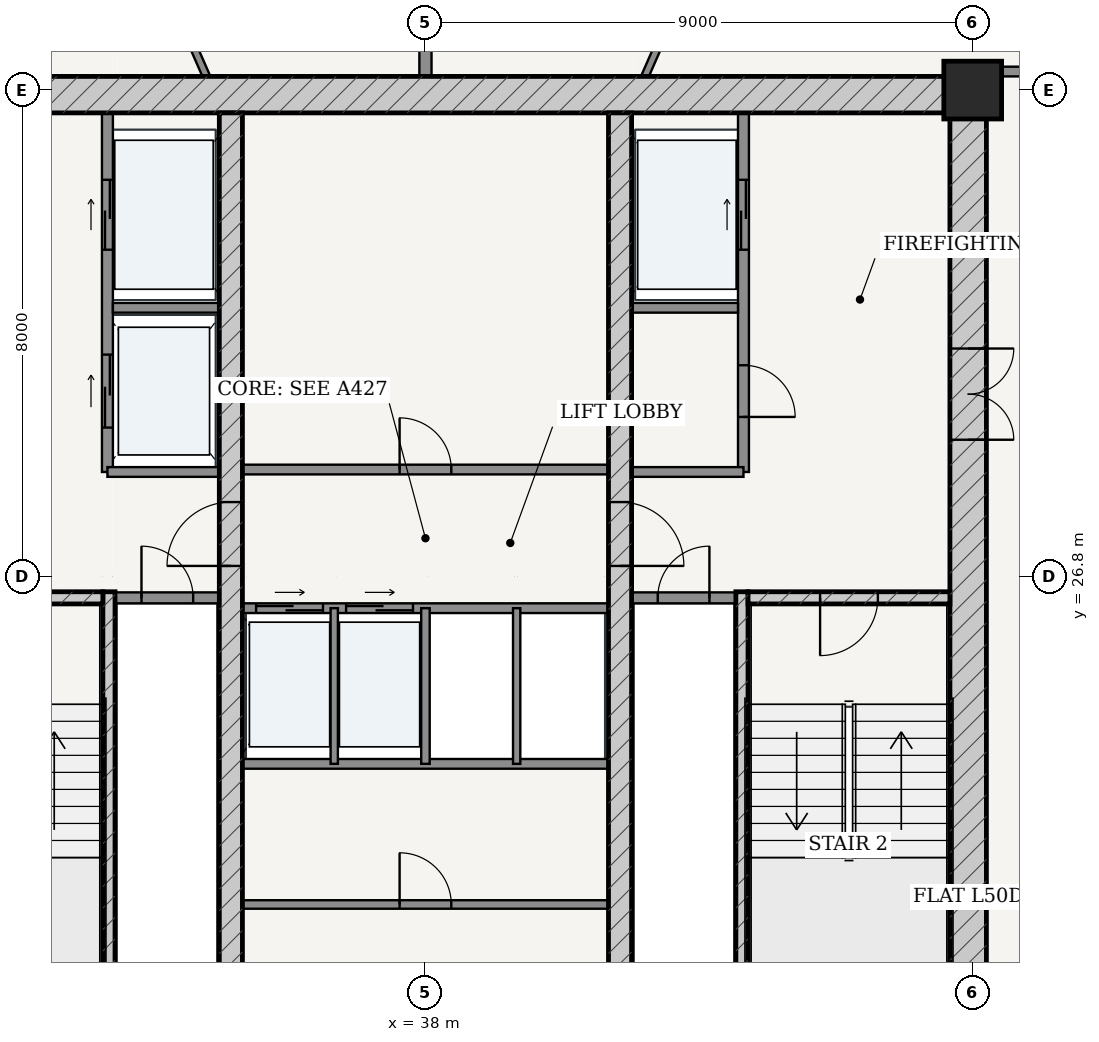
"""IFC4 building model, lengths in metres.
Left out: names, types, materials, properties, quantities, classifications, styles, units other than length and angle.
Written with IfcOpenShell. Run it as: python <this file> out.ifc"""

import sys

from ifc_helpers import new_model, si_unit, direction, frame, frame_2d, origin, origin_2d, place, context, subcontext, project, spatial, rectangle, extrude, source, transform, mapped, element, fill, save


model = new_model("IFC4")
c1 = context("Model", 3, precision=1e-05, world=origin(), true_north=direction((-0.2419218956, 0.970295726276)))
c2 = subcontext(c1, "Body", "Model", "MODEL_VIEW")
j1 = project(units=[si_unit("LENGTHUNIT", "METRE"), si_unit("PLANEANGLEUNIT", "RADIAN")], contexts=[c1])
p1 = place(None, origin())
s1 = spatial("IfcSite", under=j1, at=p1, CompositionType="ELEMENT")
p2 = place(p1, origin())
s2 = spatial("IfcBuilding", under=s1, at=p2, CompositionType="ELEMENT")
p3 = place(p2, frame((0.0, 0.0, 191.2)))
s3 = spatial("IfcBuildingStorey", under=s2, at=p3, CompositionType="ELEMENT", Elevation=191.2)
p4 = place(p3, frame((47.0, 34.8, 0.0), z_axis=(0.0, 0.0, 1.0), x_axis=(1.0, 0.0, 0.0)))
e1 = element("IfcColumn", 1, at=p4, inside=s3, PredefinedType="COLUMN", context=c2, shape_type="SweptSolid", body=[
    extrude(rectangle(XDim=0.95, YDim=0.95, at=origin_2d()), origin(), (0.0, 0.0, 1.0), 3.7),
])
p5 = place(p3, frame((28.775, 34.725, 0.0), z_axis=(0.0, 0.0, 1.0), x_axis=(1.0, 0.0, 0.0)))
e2 = element("IfcWall", 2, at=p5, inside=s3, PredefinedType="SHEAR", context=c2, shape_type="SweptSolid", body=[
    extrude(rectangle(XDim=18.45, YDim=0.6, at=frame_2d((9.225, 0.0))), origin(), (0.0, 0.0, 1.0), 3.435),
])
p6 = place(p3, frame((46.925, 19.175, 0.0), z_axis=(0.0, 0.0, 1.0), x_axis=(0.0, 1.0, 0.0)))
e3 = element("IfcWall", 3, at=p6, inside=s3, PredefinedType="SHEAR", context=c2, shape_type="SweptSolid", body=[
    extrude(rectangle(XDim=15.25, YDim=0.6, at=frame_2d((7.625, 0.0))), origin(), (0.0, 0.0, 1.0), 3.435),
])
p7 = place(p6, frame((9.875, 0.0, 0.0)))
e4 = element("IfcOpeningElement", 4, at=p7, cuts=e3, PredefinedType="OPENING", context=c2, shape_type="SweptSolid", body=[
    extrude(rectangle(XDim=1.5, YDim=2.2, at=frame_2d((0.75, 1.1))), frame((0.0, 0.31, 0.0), z_axis=(0.0, -1.0, 0.0), x_axis=(1.0, 0.0, 0.0)), (0.0, 0.0, 1.0), 0.62),
])
p8 = place(p3, frame((32.795, 19.175, 0.0), z_axis=(0.0, 0.0, 1.0), x_axis=(0.0, 1.0, 0.0)))
e5 = element("IfcWall", 5, at=p8, inside=s3, PredefinedType="SOLIDWALL", context=c2, shape_type="SweptSolid", body=[
    extrude(rectangle(XDim=7.375, YDim=0.2, at=frame_2d((3.688, 0.0))), origin(), (0.0, 0.0, 1.0), 3.435),
])
p9 = place(p3, frame((29.375, 26.45, 0.0), z_axis=(0.0, 0.0, 1.0), x_axis=(1.0, 0.0, 0.0)))
e6 = element("IfcWall", 6, at=p9, inside=s3, PredefinedType="SOLIDWALL", context=c2, shape_type="SweptSolid", body=[
    extrude(rectangle(XDim=3.32, YDim=0.2, at=frame_2d((1.66, 0.0))), origin(), (0.0, 0.0, 1.0), 3.435),
])
p10 = place(p9, frame((1.185, 0.0, 0.0)))
e7 = element("IfcOpeningElement", 7, at=p10, cuts=e6, PredefinedType="OPENING", context=c2, shape_type="SweptSolid", body=[
    extrude(rectangle(XDim=0.95, YDim=2.15, at=frame_2d((0.475, 1.075))), frame((0.0, 0.11, 0.0), z_axis=(0.0, -1.0, 0.0), x_axis=(1.0, 0.0, 0.0)), (0.0, 0.0, 1.0), 0.22),
])
p11 = place(p3, frame((43.205, 19.175, 0.0), z_axis=(0.0, 0.0, 1.0), x_axis=(0.0, 1.0, 0.0)))
e8 = element("IfcWall", 8, at=p11, inside=s3, PredefinedType="SOLIDWALL", context=c2, shape_type="SweptSolid", body=[
    extrude(rectangle(XDim=7.375, YDim=0.2, at=frame_2d((3.688, 0.0))), origin(), (0.0, 0.0, 1.0), 3.435),
])
p12 = place(p3, frame((43.305, 26.45, 0.0), z_axis=(0.0, 0.0, 1.0), x_axis=(1.0, 0.0, 0.0)))
e9 = element("IfcWall", 9, at=p12, inside=s3, PredefinedType="SOLIDWALL", context=c2, shape_type="SweptSolid", body=[
    extrude(rectangle(XDim=3.32, YDim=0.2, at=frame_2d((1.66, 0.0))), origin(), (0.0, 0.0, 1.0), 3.435),
])
p13 = place(p12, frame((1.185, 0.0, 0.0)))
e10 = element("IfcOpeningElement", 10, at=p13, cuts=e9, PredefinedType="OPENING", context=c2, shape_type="SweptSolid", body=[
    extrude(rectangle(XDim=0.95, YDim=2.15, at=frame_2d((0.475, 1.075))), frame((0.0, 0.11, 0.0), z_axis=(0.0, -1.0, 0.0), x_axis=(1.0, 0.0, 0.0)), (0.0, 0.0, 1.0), 0.22),
])
p14 = place(p3, frame((34.8, 19.175, 0.0), z_axis=(0.0, 0.0, 1.0), x_axis=(0.0, 1.0, 0.0)))
e11 = element("IfcWall", 11, at=p14, inside=s3, PredefinedType="SHEAR", context=c2, shape_type="SweptSolid", body=[
    extrude(rectangle(XDim=15.25, YDim=0.38, at=frame_2d((7.625, 0.0))), origin(), (0.0, 0.0, 1.0), 3.435),
])
p15 = place(p14, frame((7.8, 0.0, 0.0)))
e12 = element("IfcOpeningElement", 12, at=p15, cuts=e11, PredefinedType="OPENING", context=c2, shape_type="SweptSolid", body=[
    extrude(rectangle(XDim=1.05, YDim=2.15, at=frame_2d((0.525, 1.075))), frame((0.0, 0.2, 0.0), z_axis=(0.0, -1.0, 0.0), x_axis=(1.0, 0.0, 0.0)), (0.0, 0.0, 1.0), 0.4),
])
p16 = place(p3, frame((41.2, 19.175, 0.0), z_axis=(0.0, 0.0, 1.0), x_axis=(0.0, 1.0, 0.0)))
e13 = element("IfcWall", 13, at=p16, inside=s3, PredefinedType="SHEAR", context=c2, shape_type="SweptSolid", body=[
    extrude(rectangle(XDim=15.25, YDim=0.38, at=frame_2d((7.625, 0.0))), origin(), (0.0, 0.0, 1.0), 3.435),
])
p17 = place(p16, frame((7.8, 0.0, 0.0)))
e14 = element("IfcOpeningElement", 14, at=p17, cuts=e13, PredefinedType="OPENING", context=c2, shape_type="SweptSolid", body=[
    extrude(rectangle(XDim=1.05, YDim=2.15, at=frame_2d((0.525, 1.075))), frame((0.0, 0.2, 0.0), z_axis=(0.0, -1.0, 0.0), x_axis=(1.0, 0.0, 0.0)), (0.0, 0.0, 1.0), 0.4),
])
p18 = place(p3, frame((32.9, 26.45, 0.0), z_axis=(0.0, 0.0, 1.0), x_axis=(1.0, 0.0, 0.0)))
e15 = element("IfcWall", 15, at=p18, inside=s3, PredefinedType="PARTITIONING", context=c2, shape_type="SweptSolid", body=[
    extrude(rectangle(XDim=1.71, YDim=0.18, at=frame_2d((0.855, 0.0))), origin(), (0.0, 0.0, 1.0), 3.435),
])
p19 = place(p18, frame((0.43, 0.0, 0.0)))
e16 = element("IfcOpeningElement", 16, at=p19, cuts=e15, PredefinedType="OPENING", context=c2, shape_type="SweptSolid", body=[
    extrude(rectangle(XDim=0.85, YDim=2.1, at=frame_2d((0.425, 1.05))), frame((0.0, 0.1, 0.0), z_axis=(0.0, -1.0, 0.0), x_axis=(1.0, 0.0, 0.0)), (0.0, 0.0, 1.0), 0.2),
])
p20 = place(p3, frame((41.39, 26.45, 0.0), z_axis=(0.0, 0.0, 1.0), x_axis=(1.0, 0.0, 0.0)))
e17 = element("IfcWall", 17, at=p20, inside=s3, PredefinedType="PARTITIONING", context=c2, shape_type="SweptSolid", body=[
    extrude(rectangle(XDim=1.71, YDim=0.18, at=frame_2d((0.855, 0.0))), origin(), (0.0, 0.0, 1.0), 3.435),
])
p21 = place(p20, frame((0.43, 0.0, 0.0)))
e18 = element("IfcOpeningElement", 18, at=p21, cuts=e17, PredefinedType="OPENING", context=c2, shape_type="SweptSolid", body=[
    extrude(rectangle(XDim=0.85, YDim=2.1, at=frame_2d((0.425, 1.05))), frame((0.0, 0.1, 0.0), z_axis=(0.0, -1.0, 0.0), x_axis=(1.0, 0.0, 0.0)), (0.0, 0.0, 1.0), 0.2),
])
p22 = place(p3, frame((32.77, 28.52, 0.0), z_axis=(0.0, 0.0, 1.0), x_axis=(0.0, 1.0, 0.0)))
e19 = element("IfcWall", 19, at=p22, inside=s3, PredefinedType="PARTITIONING", context=c2, shape_type="SweptSolid", body=[
    extrude(rectangle(XDim=5.905, YDim=0.18, at=frame_2d((2.953, 0.0))), origin(), (0.0, 0.0, 1.0), 3.435),
])
p23 = place(p22, frame((3.655, 0.0, 0.0)))
e20 = element("IfcOpeningElement", 20, at=p23, cuts=e19, PredefinedType="OPENING", context=c2, shape_type="SweptSolid", body=[
    extrude(rectangle(XDim=1.15, YDim=2.2, at=frame_2d((0.575, 1.1))), frame((0.0, 0.1, 0.0), z_axis=(0.0, -1.0, 0.0), x_axis=(1.0, 0.0, 0.0)), (0.0, 0.0, 1.0), 0.2),
])
p24 = place(p22, frame((0.73, 0.0, 0.0)))
e21 = element("IfcOpeningElement", 21, at=p24, cuts=e19, PredefinedType="OPENING", context=c2, shape_type="SweptSolid", body=[
    extrude(rectangle(XDim=1.2, YDim=2.25, at=frame_2d((0.6, 1.125))), frame((0.0, 0.1, 0.0), z_axis=(0.0, -1.0, 0.0), x_axis=(1.0, 0.0, 0.0)), (0.0, 0.0, 1.0), 0.2),
])
p25 = place(p3, frame((32.86, 31.22, 0.0), z_axis=(0.0, 0.0, 1.0), x_axis=(1.0, 0.0, 0.0)))
e22 = element("IfcWall", 22, at=p25, inside=s3, PredefinedType="PARTITIONING", context=c2, shape_type="SweptSolid", body=[
    extrude(rectangle(XDim=1.75, YDim=0.16, at=frame_2d((0.875, 0.0))), origin(), (0.0, 0.0, 1.0), 3.435),
])
p26 = place(p3, frame((32.77, 28.52, 0.0), z_axis=(0.0, 0.0, 1.0), x_axis=(1.0, 0.0, 0.0)))
e23 = element("IfcWall", 23, at=p26, inside=s3, PredefinedType="PARTITIONING", context=c2, shape_type="SweptSolid", body=[
    extrude(rectangle(XDim=1.84, YDim=0.16, at=frame_2d((0.92, 0.0))), origin(), (0.0, 0.0, 1.0), 3.435),
])
p27 = place(p3, frame((43.23, 28.52, 0.0), z_axis=(0.0, 0.0, 1.0), x_axis=(0.0, 1.0, 0.0)))
e24 = element("IfcWall", 24, at=p27, inside=s3, PredefinedType="PARTITIONING", context=c2, shape_type="SweptSolid", body=[
    extrude(rectangle(XDim=5.905, YDim=0.18, at=frame_2d((2.953, 0.0))), origin(), (0.0, 0.0, 1.0), 3.435),
])
p28 = place(p27, frame((0.905, 0.0, 0.0)))
e25 = element("IfcOpeningElement", 25, at=p28, cuts=e24, PredefinedType="OPENING", context=c2, shape_type="SweptSolid", body=[
    extrude(rectangle(XDim=0.85, YDim=2.1, at=frame_2d((0.425, 1.05))), frame((0.0, 0.1, 0.0), z_axis=(0.0, -1.0, 0.0), x_axis=(1.0, 0.0, 0.0)), (0.0, 0.0, 1.0), 0.2),
])
p29 = place(p27, frame((3.655, 0.0, 0.0)))
e26 = element("IfcOpeningElement", 26, at=p29, cuts=e24, PredefinedType="OPENING", context=c2, shape_type="SweptSolid", body=[
    extrude(rectangle(XDim=1.15, YDim=2.2, at=frame_2d((0.575, 1.1))), frame((0.0, 0.1, 0.0), z_axis=(0.0, -1.0, 0.0), x_axis=(1.0, 0.0, 0.0)), (0.0, 0.0, 1.0), 0.2),
])
p30 = place(p3, frame((41.39, 31.22, 0.0), z_axis=(0.0, 0.0, 1.0), x_axis=(1.0, 0.0, 0.0)))
e27 = element("IfcWall", 27, at=p30, inside=s3, PredefinedType="PARTITIONING", context=c2, shape_type="SweptSolid", body=[
    extrude(rectangle(XDim=1.75, YDim=0.16, at=frame_2d((0.875, 0.0))), origin(), (0.0, 0.0, 1.0), 3.435),
])
p31 = place(p3, frame((41.39, 28.52, 0.0), z_axis=(0.0, 0.0, 1.0), x_axis=(1.0, 0.0, 0.0)))
e28 = element("IfcWall", 28, at=p31, inside=s3, PredefinedType="PARTITIONING", context=c2, shape_type="SweptSolid", body=[
    extrude(rectangle(XDim=1.84, YDim=0.16, at=frame_2d((0.92, 0.0))), origin(), (0.0, 0.0, 1.0), 3.435),
])
p32 = place(p3, frame((34.99, 28.56, 0.0), z_axis=(0.0, 0.0, 1.0), x_axis=(1.0, 0.0, 0.0)))
e29 = element("IfcWall", 29, at=p32, inside=s3, PredefinedType="PARTITIONING", context=c2, shape_type="SweptSolid", body=[
    extrude(rectangle(XDim=6.02, YDim=0.16, at=frame_2d((3.01, 0.0))), origin(), (0.0, 0.0, 1.0), 3.435),
])
p33 = place(p32, frame((2.585, 0.0, 0.0)))
e30 = element("IfcOpeningElement", 30, at=p33, cuts=e29, PredefinedType="OPENING", context=c2, shape_type="SweptSolid", body=[
    extrude(rectangle(XDim=0.85, YDim=2.1, at=frame_2d((0.425, 1.05))), frame((0.0, 0.09, 0.0), z_axis=(0.0, -1.0, 0.0), x_axis=(1.0, 0.0, 0.0)), (0.0, 0.0, 1.0), 0.18),
])
p34 = place(p3, frame((34.99, 26.28, 0.0), z_axis=(0.0, 0.0, 1.0), x_axis=(1.0, 0.0, 0.0)))
e31 = element("IfcWall", 31, at=p34, inside=s3, PredefinedType="PARTITIONING", context=c2, shape_type="SweptSolid", body=[
    extrude(rectangle(XDim=6.02, YDim=0.16, at=frame_2d((3.01, 0.0))), origin(), (0.0, 0.0, 1.0), 3.435),
])
p35 = place(p34, frame((0.225, 0.0, 0.0)))
e32 = element("IfcOpeningElement", 32, at=p35, cuts=e31, PredefinedType="OPENING", context=c2, shape_type="SweptSolid", body=[
    extrude(rectangle(XDim=1.1, YDim=2.2, at=frame_2d((0.55, 1.1))), frame((0.0, 0.09, 0.0), z_axis=(0.0, -1.0, 0.0), x_axis=(1.0, 0.0, 0.0)), (0.0, 0.0, 1.0), 0.18),
])
p36 = place(p34, frame((1.705, 0.0, 0.0)))
e33 = element("IfcOpeningElement", 33, at=p36, cuts=e31, PredefinedType="OPENING", context=c2, shape_type="SweptSolid", body=[
    extrude(rectangle(XDim=1.1, YDim=2.2, at=frame_2d((0.55, 1.1))), frame((0.0, 0.09, 0.0), z_axis=(0.0, -1.0, 0.0), x_axis=(1.0, 0.0, 0.0)), (0.0, 0.0, 1.0), 0.18),
])
p37 = place(p3, frame((34.99, 23.72, 0.0), z_axis=(0.0, 0.0, 1.0), x_axis=(1.0, 0.0, 0.0)))
e34 = element("IfcWall", 34, at=p37, inside=s3, PredefinedType="PARTITIONING", context=c2, shape_type="SweptSolid", body=[
    extrude(rectangle(XDim=6.02, YDim=0.16, at=frame_2d((3.01, 0.0))), origin(), (0.0, 0.0, 1.0), 3.435),
])
p38 = place(p3, frame((36.5, 23.72, 0.0), z_axis=(0.0, 0.0, 1.0), x_axis=(0.0, 1.0, 0.0)))
e35 = element("IfcWall", 35, at=p38, inside=s3, PredefinedType="PARTITIONING", context=c2, shape_type="SweptSolid", body=[
    extrude(rectangle(XDim=2.56, YDim=0.12, at=frame_2d((1.28, 0.0))), origin(), (0.0, 0.0, 1.0), 3.435),
])
p39 = place(p3, frame((38.0, 23.72, 0.0), z_axis=(0.0, 0.0, 1.0), x_axis=(0.0, 1.0, 0.0)))
e36 = element("IfcWall", 36, at=p39, inside=s3, PredefinedType="PARTITIONING", context=c2, shape_type="SweptSolid", body=[
    extrude(rectangle(XDim=2.56, YDim=0.14, at=frame_2d((1.28, 0.0))), origin(), (0.0, 0.0, 1.0), 3.435),
])
p40 = place(p3, frame((39.5, 23.72, 0.0), z_axis=(0.0, 0.0, 1.0), x_axis=(0.0, 1.0, 0.0)))
e37 = element("IfcWall", 37, at=p40, inside=s3, PredefinedType="PARTITIONING", context=c2, shape_type="SweptSolid", body=[
    extrude(rectangle(XDim=2.56, YDim=0.12, at=frame_2d((1.28, 0.0))), origin(), (0.0, 0.0, 1.0), 3.435),
])
p41 = place(p3, frame((34.99, 21.407, 0.0), z_axis=(0.0, 0.0, 1.0), x_axis=(1.0, 0.0, 0.0)))
e38 = element("IfcWall", 38, at=p41, inside=s3, PredefinedType="PARTITIONING", context=c2, shape_type="SweptSolid", body=[
    extrude(rectangle(XDim=6.02, YDim=0.14, at=frame_2d((3.01, 0.0))), origin(), (0.0, 0.0, 1.0), 3.435),
])
p42 = place(p41, frame((2.585, 0.0, 0.0)))
e39 = element("IfcOpeningElement", 39, at=p42, cuts=e38, PredefinedType="OPENING", context=c2, shape_type="SweptSolid", body=[
    extrude(rectangle(XDim=0.85, YDim=2.1, at=frame_2d((0.425, 1.05))), frame((0.0, 0.08, 0.0), z_axis=(0.0, -1.0, 0.0), x_axis=(1.0, 0.0, 0.0)), (0.0, 0.0, 1.0), 0.16),
])
p43 = place(p3, frame((47.225, 35.105, 0.0), z_axis=(0.0, 0.0, 1.0), x_axis=(1.0, 0.0, 0.0)))
e40 = element("IfcWall", 40, at=p43, inside=s3, PredefinedType="PARTITIONING", context=c2, shape_type="SweptSolid", body=[
    extrude(rectangle(XDim=1.93, YDim=0.16, at=frame_2d((0.965, 0.0))), origin(), (0.0, 0.0, 1.0), 3.435),
])
p44 = place(p43, frame((0.58, 0.0, 0.0)))
e41 = element("IfcOpeningElement", 41, at=p44, cuts=e40, PredefinedType="OPENING", context=c2, shape_type="SweptSolid", body=[
    extrude(rectangle(XDim=0.98, YDim=2.2, at=frame_2d((0.49, 1.1))), frame((0.0, 0.09, 0.0), z_axis=(0.0, -1.0, 0.0), x_axis=(1.0, 0.0, 0.0)), (0.0, 0.0, 1.0), 0.18),
])
p45 = place(p3, frame((41.61, 35.027, 0.0), z_axis=(0.0, 0.0, 1.0), x_axis=(0.401859508224, 0.915701335398, 0.0)))
e42 = element("IfcWall", 42, at=p45, inside=s3, PredefinedType="PARTITIONING", context=c2, shape_type="SweptSolid", body=[
    extrude(rectangle(XDim=2.83, YDim=0.12, at=frame_2d((1.415, 0.0))), origin(), (0.0, 0.0, 1.0), 3.435),
])
p46 = place(p45, frame((0.965, 0.0, 0.0)))
e43 = element("IfcOpeningElement", 43, at=p46, cuts=e42, PredefinedType="OPENING", context=c2, shape_type="SweptSolid", body=[
    extrude(rectangle(XDim=0.9, YDim=2.15, at=frame_2d((0.45, 1.075))), frame((0.0, 0.07, 0.0), z_axis=(0.0, -1.0, 0.0), x_axis=(1.0, 0.0, 0.0)), (0.0, 0.0, 1.0), 0.14),
])
p47 = place(p3, frame((38.0, 35.027, 0.0), z_axis=(0.0, 0.0, 1.0), x_axis=(0.0, 1.0, 0.0)))
e44 = element("IfcWall", 44, at=p47, inside=s3, PredefinedType="PARTITIONING", context=c2, shape_type="SweptSolid", body=[
    extrude(rectangle(XDim=11.413, YDim=0.2, at=frame_2d((5.707, 0.0))), origin(), (0.0, 0.0, 1.0), 2.52),
])
p48 = place(p3, frame((34.397, 35.027, 0.0), z_axis=(0.0, 0.0, 1.0), x_axis=(-0.401135725485, 0.916018629581, 0.0)))
e45 = element("IfcWall", 45, at=p48, inside=s3, PredefinedType="PARTITIONING", context=c2, shape_type="SweptSolid", body=[
    extrude(rectangle(XDim=2.829, YDim=0.12, at=frame_2d((1.415, 0.0))), origin(), (0.0, 0.0, 1.0), 3.435),
])
p49 = place(p48, frame((0.985, 0.0, 0.0)))
e46 = element("IfcOpeningElement", 46, at=p49, cuts=e45, PredefinedType="OPENING", context=c2, shape_type="SweptSolid", body=[
    extrude(rectangle(XDim=0.86, YDim=2.15, at=frame_2d((0.43, 1.075))), frame((0.0, 0.07, 0.0), z_axis=(0.0, -1.0, 0.0), x_axis=(1.0, 0.0, 0.0)), (0.0, 0.0, 1.0), 0.14),
])
m1 = source(origin(), c2, "Body", "SweptSolid", [
    extrude(rectangle(XDim=1.5, YDim=2.2, at=frame_2d((0.75, 1.1))), frame((0.0, 0.025, 0.0), z_axis=(0.0, -1.0, 0.0), x_axis=(1.0, 0.0, 0.0)), (0.0, 0.0, 1.0), 0.05),
])
p50 = place(p7, frame((1.5, 0.0, 0.0), z_axis=(0.0, 0.0, 1.0), x_axis=(-1.0, 0.0, 0.0)))
e47 = element("IfcDoor", 47, at=p50, inside=s3, OperationType="DOUBLE_DOOR_SINGLE_SWING", PredefinedType="DOOR", context=c2, shape_type="MappedRepresentation", body=[
    mapped(m1, transform((0.0, 0.0, 0.0), scale=1.0)),
])
fill(e4, e47)
m2 = source(origin(), c2, "Body", "SweptSolid", [
    extrude(rectangle(XDim=1.05, YDim=2.15, at=frame_2d((0.525, 1.075))), frame((0.0, 0.025, 0.0), z_axis=(0.0, -1.0, 0.0), x_axis=(1.0, 0.0, 0.0)), (0.0, 0.0, 1.0), 0.05),
])
p51 = place(p15, origin())
e48 = element("IfcDoor", 48, at=p51, inside=s3, OperationType="SINGLE_SWING_LEFT", PredefinedType="DOOR", context=c2, shape_type="MappedRepresentation", body=[
    mapped(m2, transform((0.0, 0.0, 0.0), scale=1.0)),
])
fill(e12, e48)
p52 = place(p17, frame((1.05, 0.0, 0.0), z_axis=(0.0, 0.0, 1.0), x_axis=(-1.0, 0.0, 0.0)))
e49 = element("IfcDoor", 49, at=p52, inside=s3, OperationType="SINGLE_SWING_RIGHT", PredefinedType="DOOR", context=c2, shape_type="MappedRepresentation", body=[
    mapped(m2, transform((0.0, 0.0, 0.0), scale=1.0)),
])
fill(e14, e49)
m3 = source(origin(), c2, "Body", "SweptSolid", [
    extrude(rectangle(XDim=0.95, YDim=2.15, at=frame_2d((0.475, 1.075))), frame((0.0, 0.025, 0.0), z_axis=(0.0, -1.0, 0.0), x_axis=(1.0, 0.0, 0.0)), (0.0, 0.0, 1.0), 0.05),
])
p53 = place(p13, frame((0.95, 0.0, 0.0), z_axis=(0.0, 0.0, 1.0), x_axis=(-1.0, 0.0, 0.0)))
e50 = element("IfcDoor", 50, at=p53, inside=s3, OperationType="SINGLE_SWING_RIGHT", PredefinedType="DOOR", context=c2, shape_type="MappedRepresentation", body=[
    mapped(m3, transform((0.0, 0.0, 0.0), scale=1.0)),
])
fill(e10, e50)
m4 = source(origin(), c2, "Body", "SweptSolid", [
    extrude(rectangle(XDim=0.85, YDim=2.1, at=frame_2d((0.425, 1.05))), frame((0.0, 0.025, 0.0), z_axis=(0.0, -1.0, 0.0), x_axis=(1.0, 0.0, 0.0)), (0.0, 0.0, 1.0), 0.05),
])
p54 = place(p19, origin())
e51 = element("IfcDoor", 51, at=p54, inside=s3, OperationType="SINGLE_SWING_LEFT", PredefinedType="DOOR", context=c2, shape_type="MappedRepresentation", body=[
    mapped(m4, transform((0.0, 0.0, 0.0), scale=1.0)),
])
fill(e16, e51)
p55 = place(p21, origin())
e52 = element("IfcDoor", 52, at=p55, inside=s3, OperationType="SINGLE_SWING_RIGHT", PredefinedType="DOOR", context=c2, shape_type="MappedRepresentation", body=[
    mapped(m4, transform((0.0, 0.0, 0.0), scale=1.0)),
])
fill(e18, e52)
p56 = place(p28, frame((0.85, 0.0, 0.0), z_axis=(0.0, 0.0, 1.0), x_axis=(-1.0, 0.0, 0.0)))
e53 = element("IfcDoor", 53, at=p56, inside=s3, OperationType="SINGLE_SWING_RIGHT", PredefinedType="DOOR", context=c2, shape_type="MappedRepresentation", body=[
    mapped(m4, transform((0.0, 0.0, 0.0), scale=1.0)),
])
fill(e25, e53)
p57 = place(p33, origin())
e54 = element("IfcDoor", 54, at=p57, inside=s3, OperationType="SINGLE_SWING_LEFT", PredefinedType="DOOR", context=c2, shape_type="MappedRepresentation", body=[
    mapped(m4, transform((0.0, 0.0, 0.0), scale=1.0)),
])
fill(e30, e54)
p58 = place(p42, origin())
e55 = element("IfcDoor", 55, at=p58, inside=s3, OperationType="SINGLE_SWING_LEFT", PredefinedType="DOOR", context=c2, shape_type="MappedRepresentation", body=[
    mapped(m4, transform((0.0, 0.0, 0.0), scale=1.0)),
])
fill(e39, e55)
m5 = source(origin(), c2, "Body", "SweptSolid", [
    extrude(rectangle(XDim=1.15, YDim=2.2, at=frame_2d((0.575, 1.1))), frame((0.0, 0.025, 0.0), z_axis=(0.0, -1.0, 0.0), x_axis=(1.0, 0.0, 0.0)), (0.0, 0.0, 1.0), 0.05),
])
p59 = place(p23, origin())
e56 = element("IfcDoor", 56, at=p59, inside=s3, OperationType="DOUBLE_DOOR_SLIDING", PredefinedType="DOOR", context=c2, shape_type="MappedRepresentation", body=[
    mapped(m5, transform((0.0, 0.0, 0.0), scale=1.0)),
])
fill(e20, e56)
p60 = place(p29, origin())
e57 = element("IfcDoor", 57, at=p60, inside=s3, OperationType="DOUBLE_DOOR_SLIDING", PredefinedType="DOOR", context=c2, shape_type="MappedRepresentation", body=[
    mapped(m5, transform((0.0, 0.0, 0.0), scale=1.0)),
])
fill(e26, e57)
m6 = source(origin(), c2, "Body", "SweptSolid", [
    extrude(rectangle(XDim=1.2, YDim=2.25, at=frame_2d((0.6, 1.125))), frame((0.0, 0.025, 0.0), z_axis=(0.0, -1.0, 0.0), x_axis=(1.0, 0.0, 0.0)), (0.0, 0.0, 1.0), 0.05),
])
p61 = place(p24, origin())
e58 = element("IfcDoor", 58, at=p61, inside=s3, OperationType="DOUBLE_DOOR_SLIDING", PredefinedType="DOOR", context=c2, shape_type="MappedRepresentation", body=[
    mapped(m6, transform((0.0, 0.0, 0.0), scale=1.0)),
])
fill(e21, e58)
m7 = source(origin(), c2, "Body", "SweptSolid", [
    extrude(rectangle(XDim=1.1, YDim=2.2, at=frame_2d((0.55, 1.1))), frame((0.0, 0.025, 0.0), z_axis=(0.0, -1.0, 0.0), x_axis=(1.0, 0.0, 0.0)), (0.0, 0.0, 1.0), 0.05),
])
p62 = place(p35, origin())
e59 = element("IfcDoor", 59, at=p62, inside=s3, OperationType="DOUBLE_DOOR_SLIDING", PredefinedType="DOOR", context=c2, shape_type="MappedRepresentation", body=[
    mapped(m7, transform((0.0, 0.0, 0.0), scale=1.0)),
])
fill(e32, e59)
p63 = place(p36, origin())
e60 = element("IfcDoor", 60, at=p63, inside=s3, OperationType="DOUBLE_DOOR_SLIDING", PredefinedType="DOOR", context=c2, shape_type="MappedRepresentation", body=[
    mapped(m7, transform((0.0, 0.0, 0.0), scale=1.0)),
])
fill(e33, e60)
save(model, sys.argv[1])
